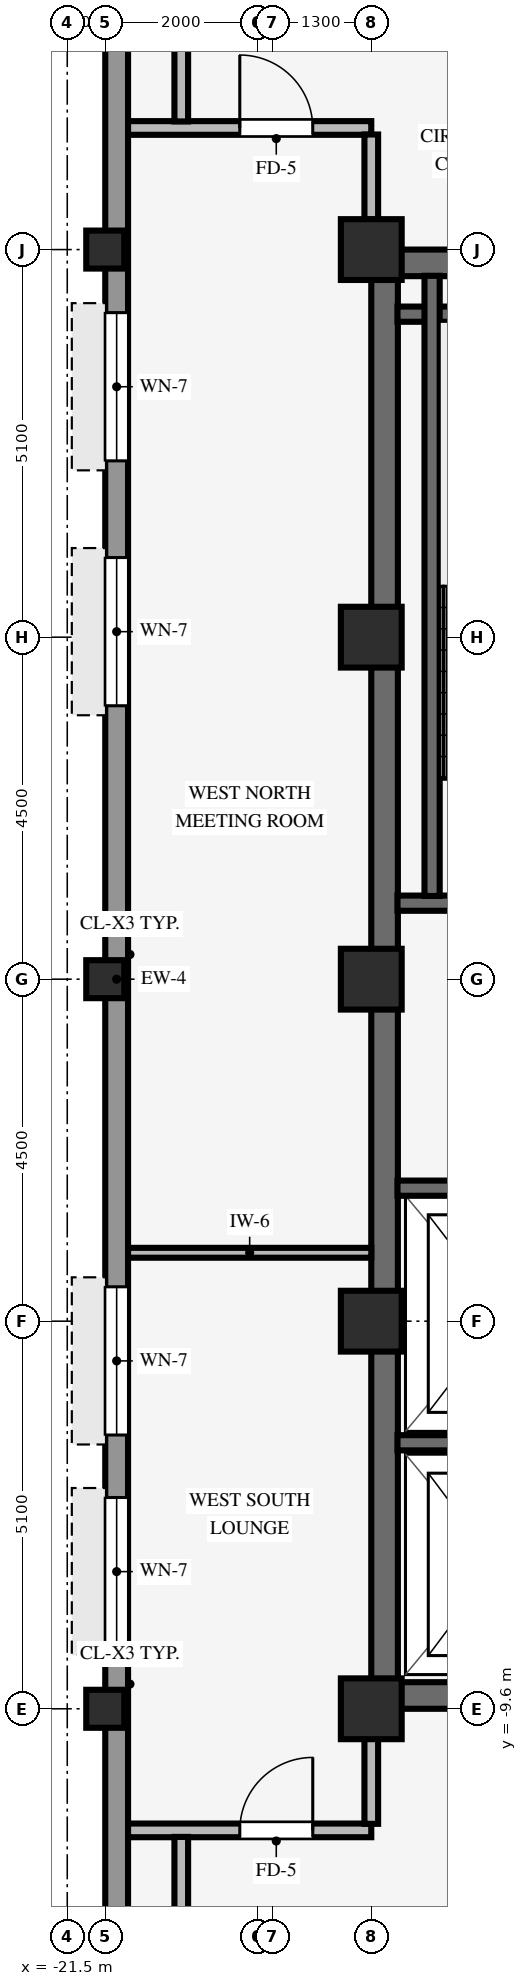
"""IFC4 building model, lengths in metres.
Left out: names, types, materials, properties, quantities, classifications, styles, units other than length and angle.
Written with IfcOpenShell. Run it as: python <this file> out.ifc"""

import sys

from ifc_helpers import new_model, si_unit, direction, frame, frame_2d, origin, origin_2d, place, context, subcontext, project, spatial, rectangle, hollow_rectangle, extrude, source, transform, mapped, element, fill, save


model = new_model("IFC4")
c1 = context("Model", 3, precision=1e-05, world=origin(), true_north=direction((0.0, 1.0)))
c2 = subcontext(c1, "Body", "Model", "MODEL_VIEW")
j1 = project(units=[si_unit("LENGTHUNIT", "METRE"), si_unit("PLANEANGLEUNIT", "RADIAN")], contexts=[c1])
p1 = place(None, origin())
s1 = spatial("IfcSite", under=j1, at=p1, CompositionType="ELEMENT")
p2 = place(p1, origin())
s2 = spatial("IfcBuilding", under=s1, at=p2, CompositionType="ELEMENT")
p3 = place(p2, frame((0.0, 0.0, 268.9)))
s3 = spatial("IfcBuildingStorey", under=s2, at=p3, CompositionType="ELEMENT", Elevation=268.9)
for number, where, z_axis, x_axis in (
    (1, (-17.5, -9.425, 0.0), (0.0, 0.0, 1.0), (1.0, 0.0, 0.0)),
    (2, (-17.5, 9.425, 0.0), (0.0, 0.0, 1.0), (1.0, 0.0, 0.0)),
):
    element("IfcWall", number, at=place(p3, frame(where, z_axis=z_axis, x_axis=x_axis)), inside=s3, PredefinedType="SHEAR", context=c2, shape_type="SweptSolid", body=[
        extrude(rectangle(XDim=8.5, YDim=0.35, at=frame_2d((4.25, 0.0))), origin(), (0.0, 0.0, 1.0), 3.37),
    ])
p4 = place(p3, frame((-17.325, -9.255, 0.0), z_axis=(0.0, 0.0, 1.0), x_axis=(0.0, 1.0, 0.0)))
e3 = element("IfcWall", 3, at=p4, inside=s3, PredefinedType="SHEAR", context=c2, shape_type="SweptSolid", body=[
    extrude(rectangle(XDim=18.51, YDim=0.35, at=frame_2d((9.255, 0.0))), origin(), (0.0, 0.0, 1.0), 3.37),
])
for number, where, z_axis, x_axis in (
    (4, (-17.5, -9.6, 0.0), (0.0, 0.0, 1.0), (1.0, 0.0, 0.0)),
    (5, (-17.5, -4.5, 0.0), (0.0, 0.0, 1.0), (1.0, 0.0, 0.0)),
    (6, (-17.5, 4.5, 0.0), (0.0, 0.0, 1.0), (1.0, 0.0, 0.0)),
    (7, (-17.5, 9.6, 0.0), (0.0, 0.0, 1.0), (1.0, 0.0, 0.0)),
    (8, (-17.5, 0.0, 0.0), (0.0, 0.0, 1.0), (1.0, 0.0, 0.0)),
):
    element("IfcColumn", number, at=place(p3, frame(where, z_axis=z_axis, x_axis=x_axis)), inside=s3, PredefinedType="COLUMN", context=c2, shape_type="SweptSolid", body=[
        extrude(rectangle(XDim=0.8, YDim=0.8, at=origin_2d()), origin(), (0.0, 0.0, 1.0), 3.37),
    ])
for number, where, z_axis, x_axis in (
    (9, (-21.0, -9.6, 0.0), (0.0, 0.0, 1.0), (1.0, 0.0, 0.0)),
    (10, (-21.0, 0.0, 0.0), (0.0, 0.0, 1.0), (1.0, 0.0, 0.0)),
    (11, (-21.0, 9.6, 0.0), (0.0, 0.0, 1.0), (1.0, 0.0, 0.0)),
):
    element("IfcColumn", number, at=place(p3, frame(where, z_axis=z_axis, x_axis=x_axis)), inside=s3, PredefinedType="COLUMN", context=c2, shape_type="SweptSolid", body=[
        extrude(hollow_rectangle(XDim=0.5, YDim=0.5, WallThickness=0.032, InnerFilletRadius=0.032, OuterFilletRadius=0.064, at=origin_2d()), origin(), (0.0, 0.0, 1.0), 3.37),
    ])
p5 = place(p3, frame((-20.85, -17.004, 0.0), z_axis=(0.0, 0.0, 1.0), x_axis=(0.0, 1.0, 0.0)))
e12 = element("IfcWall", 12, at=p5, inside=s3, PredefinedType="STANDARD", context=c2, shape_type="SweptSolid", body=[
    extrude(rectangle(XDim=34.008, YDim=0.3, at=frame_2d((17.004, 0.0))), origin(), (0.0, 0.0, 1.0), 2.705),
])
p6 = place(p5, frame((0.961, 0.0, 0.8)))
e13 = element("IfcOpeningElement", 13, at=p6, cuts=e12, PredefinedType="OPENING", context=c2, shape_type="SweptSolid", body=[
    extrude(rectangle(XDim=1.95, YDim=1.48, at=frame_2d((0.975, 0.74))), frame((0.0, 0.16, 0.0), z_axis=(0.0, -1.0, 0.0), x_axis=(1.0, 0.0, 0.0)), (0.0, 0.0, 1.0), 0.32),
])
p7 = place(p5, frame((8.234, 0.0, 0.8)))
e14 = element("IfcOpeningElement", 14, at=p7, cuts=e12, PredefinedType="OPENING", context=c2, shape_type="SweptSolid", body=[
    extrude(rectangle(XDim=1.95, YDim=1.48, at=frame_2d((0.975, 0.74))), frame((0.0, 0.16, 0.0), z_axis=(0.0, -1.0, 0.0), x_axis=(1.0, 0.0, 0.0)), (0.0, 0.0, 1.0), 0.32),
])
p8 = place(p5, frame((11.006, 0.0, 0.8)))
e15 = element("IfcOpeningElement", 15, at=p8, cuts=e12, PredefinedType="OPENING", context=c2, shape_type="SweptSolid", body=[
    extrude(rectangle(XDim=1.95, YDim=1.48, at=frame_2d((0.975, 0.74))), frame((0.0, 0.16, 0.0), z_axis=(0.0, -1.0, 0.0), x_axis=(1.0, 0.0, 0.0)), (0.0, 0.0, 1.0), 0.32),
])
p9 = place(p5, frame((20.602, 0.0, 0.8)))
e16 = element("IfcOpeningElement", 16, at=p9, cuts=e12, PredefinedType="OPENING", context=c2, shape_type="SweptSolid", body=[
    extrude(rectangle(XDim=1.95, YDim=1.48, at=frame_2d((0.975, 0.74))), frame((0.0, 0.16, 0.0), z_axis=(0.0, -1.0, 0.0), x_axis=(1.0, 0.0, 0.0)), (0.0, 0.0, 1.0), 0.32),
])
p10 = place(p5, frame((23.824, 0.0, 0.8)))
e17 = element("IfcOpeningElement", 17, at=p10, cuts=e12, PredefinedType="OPENING", context=c2, shape_type="SweptSolid", body=[
    extrude(rectangle(XDim=1.95, YDim=1.48, at=frame_2d((0.975, 0.74))), frame((0.0, 0.16, 0.0), z_axis=(0.0, -1.0, 0.0), x_axis=(1.0, 0.0, 0.0)), (0.0, 0.0, 1.0), 0.32),
])
p11 = place(p5, frame((31.097, 0.0, 0.8)))
e18 = element("IfcOpeningElement", 18, at=p11, cuts=e12, PredefinedType="OPENING", context=c2, shape_type="SweptSolid", body=[
    extrude(rectangle(XDim=1.95, YDim=1.48, at=frame_2d((0.975, 0.74))), frame((0.0, 0.16, 0.0), z_axis=(0.0, -1.0, 0.0), x_axis=(1.0, 0.0, 0.0)), (0.0, 0.0, 1.0), 0.32),
])
for number, where, z_axis, x_axis in (
    (19, (-17.155, 1.0, 0.0), (0.0, 0.0, 1.0), (1.0, 0.0, 0.0)),
    (20, (-17.155, 8.75, 0.0), (0.0, 0.0, 1.0), (1.0, 0.0, 0.0)),
):
    element("IfcWall", number, at=place(p3, frame(where, z_axis=z_axis, x_axis=x_axis)), inside=s3, PredefinedType="SHEAR", context=c2, shape_type="SweptSolid", body=[
        extrude(rectangle(XDim=3.62, YDim=0.2, at=frame_2d((1.81, 0.0))), origin(), (0.0, 0.0, 1.0), 3.37),
    ])
p12 = place(p3, frame((-16.7, 1.095, 0.0), z_axis=(0.0, 0.0, 1.0), x_axis=(0.0, 1.0, 0.0)))
e21 = element("IfcWall", 21, at=p12, inside=s3, PredefinedType="SHEAR", context=c2, shape_type="SweptSolid", body=[
    extrude(rectangle(XDim=8.16, YDim=0.2, at=frame_2d((4.08, 0.0))), origin(), (0.0, 0.0, 1.0), 3.37),
])
p13 = place(p3, frame((-17.155, -6.1, 0.0), z_axis=(0.0, 0.0, 1.0), x_axis=(1.0, 0.0, 0.0)))
e22 = element("IfcWall", 22, at=p13, inside=s3, PredefinedType="SHEAR", context=c2, shape_type="SweptSolid", body=[
    extrude(rectangle(XDim=2.905, YDim=0.2, at=frame_2d((1.453, 0.0))), origin(), (0.0, 0.0, 1.0), 3.37),
])
p14 = place(p3, frame((-17.155, -2.75, 0.0), z_axis=(0.0, 0.0, 1.0), x_axis=(1.0, 0.0, 0.0)))
e23 = element("IfcWall", 23, at=p14, inside=s3, PredefinedType="SHEAR", context=c2, shape_type="SweptSolid", body=[
    extrude(rectangle(XDim=2.71, YDim=0.2, at=frame_2d((1.355, 0.0))), origin(), (0.0, 0.0, 1.0), 3.37),
])
p15 = place(p3, frame((-20.7, -11.2, 0.0), z_axis=(0.0, 0.0, 1.0), x_axis=(1.0, 0.0, 0.0)))
e24 = element("IfcWall", 24, at=p15, inside=s3, PredefinedType="PARTITIONING", context=c2, shape_type="SweptSolid", body=[
    extrude(rectangle(XDim=3.2, YDim=0.18, at=frame_2d((1.6, 0.0))), origin(), (0.0, 0.0, 1.0), 3.36),
])
p16 = place(p15, frame((1.47, 0.0, 0.0)))
e25 = element("IfcOpeningElement", 25, at=p16, cuts=e24, PredefinedType="OPENING", context=c2, shape_type="SweptSolid", body=[
    extrude(rectangle(XDim=0.96, YDim=2.1, at=frame_2d((0.48, 1.05))), frame((0.0, 0.1, 0.0), z_axis=(0.0, -1.0, 0.0), x_axis=(1.0, 0.0, 0.0)), (0.0, 0.0, 1.0), 0.2),
])
p17 = place(p3, frame((-20.7, -3.6, 0.0), z_axis=(0.0, 0.0, 1.0), x_axis=(1.0, 0.0, 0.0)))
e26 = element("IfcWall", 26, at=p17, inside=s3, PredefinedType="PARTITIONING", context=c2, shape_type="SweptSolid", body=[
    extrude(rectangle(XDim=3.2, YDim=0.13, at=frame_2d((1.6, 0.0))), origin(), (0.0, 0.0, 1.0), 3.36),
])
p18 = place(p3, frame((-20.7, 11.2, 0.0), z_axis=(0.0, 0.0, 1.0), x_axis=(1.0, 0.0, 0.0)))
e27 = element("IfcWall", 27, at=p18, inside=s3, PredefinedType="PARTITIONING", context=c2, shape_type="SweptSolid", body=[
    extrude(rectangle(XDim=3.2, YDim=0.18, at=frame_2d((1.6, 0.0))), origin(), (0.0, 0.0, 1.0), 3.36),
])
p19 = place(p18, frame((1.47, 0.0, 0.0)))
e28 = element("IfcOpeningElement", 28, at=p19, cuts=e27, PredefinedType="OPENING", context=c2, shape_type="SweptSolid", body=[
    extrude(rectangle(XDim=0.96, YDim=2.1, at=frame_2d((0.48, 1.05))), frame((0.0, 0.1, 0.0), z_axis=(0.0, -1.0, 0.0), x_axis=(1.0, 0.0, 0.0)), (0.0, 0.0, 1.0), 0.2),
])
for number, where, z_axis, x_axis in (
    (29, (-20.0, -13.514, 0.0), (0.0, 0.0, 1.0), (0.0, 1.0, 0.0)),
    (30, (-20.0, 11.286, 0.0), (0.0, 0.0, 1.0), (0.0, 1.0, 0.0)),
):
    element("IfcWall", number, at=place(p3, frame(where, z_axis=z_axis, x_axis=x_axis)), inside=s3, PredefinedType="PARTITIONING", context=c2, shape_type="SweptSolid", body=[
        extrude(rectangle(XDim=2.228, YDim=0.18, at=frame_2d((1.114, 0.0))), origin(), (0.0, 0.0, 1.0), 3.36),
    ])
for number, where, z_axis, x_axis in (
    (31, (-17.5, -11.114, 0.0), (0.0, 0.0, 1.0), (0.0, 1.0, 0.0)),
    (32, (-17.5, 9.996, 0.0), (0.0, 0.0, 1.0), (0.0, 1.0, 0.0)),
):
    element("IfcWall", number, at=place(p3, frame(where, z_axis=z_axis, x_axis=x_axis)), inside=s3, PredefinedType="PARTITIONING", context=c2, shape_type="SweptSolid", body=[
        extrude(rectangle(XDim=1.118, YDim=0.18, at=frame_2d((0.559, 0.0))), origin(), (0.0, 0.0, 1.0), 2.892),
    ])
m1 = source(origin(), c2, "Body", "SweptSolid", [
    extrude(rectangle(XDim=1.95, YDim=1.48, at=frame_2d((0.975, 0.74))), frame((0.0, 0.03, 0.0), z_axis=(0.0, -1.0, 0.0), x_axis=(1.0, 0.0, 0.0)), (0.0, 0.0, 1.0), 0.06),
])
p20 = place(p7, origin())
e33 = element("IfcWindow", 33, at=p20, inside=s3, PartitioningType="SINGLE_PANEL", PredefinedType="WINDOW", context=c2, shape_type="MappedRepresentation", body=[
    mapped(m1, transform((0.0, 0.0, 0.0), scale=1.0)),
])
fill(e14, e33)
p21 = place(p8, origin())
e34 = element("IfcWindow", 34, at=p21, inside=s3, PartitioningType="SINGLE_PANEL", PredefinedType="WINDOW", context=c2, shape_type="MappedRepresentation", body=[
    mapped(m1, transform((0.0, 0.0, 0.0), scale=1.0)),
])
fill(e15, e34)
p22 = place(p9, origin())
e35 = element("IfcWindow", 35, at=p22, inside=s3, PartitioningType="SINGLE_PANEL", PredefinedType="WINDOW", context=c2, shape_type="MappedRepresentation", body=[
    mapped(m1, transform((0.0, 0.0, 0.0), scale=1.0)),
])
fill(e16, e35)
p23 = place(p10, origin())
e36 = element("IfcWindow", 36, at=p23, inside=s3, PartitioningType="SINGLE_PANEL", PredefinedType="WINDOW", context=c2, shape_type="MappedRepresentation", body=[
    mapped(m1, transform((0.0, 0.0, 0.0), scale=1.0)),
])
fill(e17, e36)
m2 = source(origin(), c2, "Body", "SweptSolid", [
    extrude(rectangle(XDim=0.96, YDim=2.1, at=frame_2d((0.48, 1.05))), frame((0.0, 0.025, 0.0), z_axis=(0.0, -1.0, 0.0), x_axis=(1.0, 0.0, 0.0)), (0.0, 0.0, 1.0), 0.05),
])
p24 = place(p16, origin())
e37 = element("IfcDoor", 37, at=p24, inside=s3, OperationType="SINGLE_SWING_RIGHT", PredefinedType="DOOR", context=c2, shape_type="MappedRepresentation", body=[
    mapped(m2, transform((0.0, 0.0, 0.0), scale=1.0)),
])
fill(e25, e37)
p25 = place(p19, origin())
e38 = element("IfcDoor", 38, at=p25, inside=s3, OperationType="SINGLE_SWING_LEFT", PredefinedType="DOOR", context=c2, shape_type="MappedRepresentation", body=[
    mapped(m2, transform((0.0, 0.0, 0.0), scale=1.0)),
])
fill(e28, e38)
save(model, sys.argv[1])
